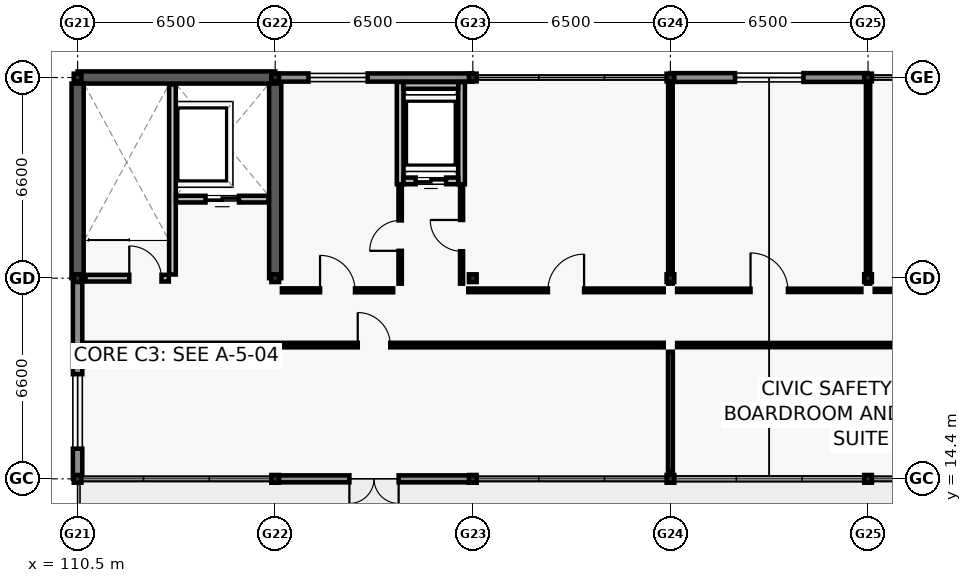
"""IFC4 building model, lengths in metres.
Left out: names, types, materials, properties, quantities, classifications, styles, units other than length and angle.
Written with IfcOpenShell. Run it as: python <this file> out.ifc"""

import sys

from ifc_helpers import new_model, si_unit, direction, frame, frame_2d, origin, origin_2d, place, context, subcontext, project, spatial, rectangle, i_section, extrude, element, fill, save


model = new_model("IFC4")
c1 = context("Model", 3, precision=1e-05, world=origin(), true_north=direction((0.0, 1.0)))
c2 = subcontext(c1, "Body", "Model", "MODEL_VIEW")
j1 = project(units=[si_unit("LENGTHUNIT", "METRE"), si_unit("PLANEANGLEUNIT", "RADIAN")], contexts=[c1])
p1 = place(None, origin())
s1 = spatial("IfcSite", under=j1, at=p1, CompositionType="ELEMENT")
p2 = place(p1, origin())
s2 = spatial("IfcBuilding", under=s1, at=p2, CompositionType="ELEMENT")
p3 = place(p2, frame((0.0, 0.0, 21.3)))
s3 = spatial("IfcBuildingStorey", under=s2, at=p3, CompositionType="ELEMENT", Elevation=21.3)
for number, where, z_axis, x_axis in (
    (1, (110.5, 14.4, 0.0), (0.0, 0.0, 1.0), (1.0, 0.0, 0.0)),
    (2, (110.5, 21.0, 0.0), (0.0, 0.0, 1.0), (1.0, 0.0, 0.0)),
    (3, (110.5, 27.6, 0.0), (0.0, 0.0, 1.0), (1.0, 0.0, 0.0)),
    (4, (117.0, 14.4, 0.0), (0.0, 0.0, 1.0), (1.0, 0.0, 0.0)),
    (5, (117.0, 21.0, 0.0), (0.0, 0.0, 1.0), (1.0, 0.0, 0.0)),
    (6, (117.0, 27.6, 0.0), (0.0, 0.0, 1.0), (1.0, 0.0, 0.0)),
    (7, (123.5, 14.4, 0.0), (0.0, 0.0, 1.0), (1.0, 0.0, 0.0)),
    (8, (123.5, 21.0, 0.0), (0.0, 0.0, 1.0), (1.0, 0.0, 0.0)),
    (9, (123.5, 27.6, 0.0), (0.0, 0.0, 1.0), (1.0, 0.0, 0.0)),
    (10, (130.0, 14.4, 0.0), (0.0, 0.0, 1.0), (1.0, 0.0, 0.0)),
    (11, (130.0, 21.0, 0.0), (0.0, 0.0, 1.0), (1.0, 0.0, 0.0)),
    (12, (130.0, 27.6, 0.0), (0.0, 0.0, 1.0), (1.0, 0.0, 0.0)),
    (13, (136.5, 14.4, 0.0), (0.0, 0.0, 1.0), (1.0, 0.0, 0.0)),
    (14, (136.5, 21.0, 0.0), (0.0, 0.0, 1.0), (1.0, 0.0, 0.0)),
    (15, (136.5, 27.6, 0.0), (0.0, 0.0, 1.0), (1.0, 0.0, 0.0)),
):
    element("IfcColumn", number, at=place(p3, frame(where, z_axis=z_axis, x_axis=x_axis)), inside=s3, PredefinedType="COLUMN", context=c2, shape_type="SweptSolid", body=[
        extrude(i_section(OverallWidth=0.254, OverallDepth=0.254, WebThickness=0.009, FlangeThickness=0.014, FilletRadius=0.013, at=origin_2d()), origin(), (0.0, 0.0, 1.0), 3.9),
    ])
p4 = place(p3, frame((110.5, 27.6, 0.0), z_axis=(0.0, 0.0, 1.0), x_axis=(1.0, 0.0, 0.0)))
e16 = element("IfcWall", 16, at=p4, inside=s3, PredefinedType="SHEAR", context=c2, shape_type="SweptSolid", body=[
    extrude(rectangle(XDim=6.5, YDim=0.4, at=frame_2d((3.25, 0.0))), origin(), (0.0, 0.0, 1.0), 3.66),
])
for number, where, z_axis, x_axis in (
    (17, (110.5, 21.0, 0.0), (0.0, 0.0, 1.0), (0.0, 1.0, 0.0)),
    (18, (117.0, 21.0, 0.0), (0.0, 0.0, 1.0), (0.0, 1.0, 0.0)),
):
    element("IfcWall", number, at=place(p3, frame(where, z_axis=z_axis, x_axis=x_axis)), inside=s3, PredefinedType="SHEAR", context=c2, shape_type="SweptSolid", body=[
        extrude(rectangle(XDim=6.4, YDim=0.4, at=frame_2d((3.2, 0.0))), origin(), (0.0, 0.0, 1.0), 3.66),
    ])
p5 = place(p3, frame((123.495, 14.4, 0.0), z_axis=(0.0, 0.0, 1.0), x_axis=(-1.0, 0.0, 0.0)))
e19 = element("IfcWall", 19, at=p5, inside=s3, PredefinedType="SOLIDWALL", context=c2, shape_type="SweptSolid", body=[
    extrude(rectangle(XDim=6.49, YDim=0.23, at=frame_2d((3.245, 0.0))), origin(), (0.0, 0.0, 1.0), 3.02),
])
p6 = place(p5, frame((2.435, 0.0, 0.0)))
e20 = element("IfcOpeningElement", 20, at=p6, cuts=e19, PredefinedType="OPENING", context=c2, shape_type="SweptSolid", body=[
    extrude(rectangle(XDim=1.62, YDim=2.18, at=frame_2d((0.81, 1.09))), frame((0.0, 0.125, 0.0), z_axis=(0.0, -1.0, 0.0), x_axis=(1.0, 0.0, 0.0)), (0.0, 0.0, 1.0), 0.25),
])
p7 = place(p3, frame((117.005, 27.6, 0.0), z_axis=(0.0, 0.0, 1.0), x_axis=(1.0, 0.0, 0.0)))
e21 = element("IfcWall", 21, at=p7, inside=s3, PredefinedType="SOLIDWALL", context=c2, shape_type="SweptSolid", body=[
    extrude(rectangle(XDim=6.49, YDim=0.27, at=frame_2d((3.245, 0.0))), origin(), (0.0, 0.0, 1.0), 3.02),
])
p8 = place(p7, frame((1.087, 0.0, 0.8)))
e22 = element("IfcOpeningElement", 22, at=p8, cuts=e21, PredefinedType="OPENING", context=c2, shape_type="SweptSolid", body=[
    extrude(rectangle(XDim=1.95, YDim=1.95, at=frame_2d((0.975, 0.975))), frame((0.0, 0.145, 0.0), z_axis=(0.0, -1.0, 0.0), x_axis=(1.0, 0.0, 0.0)), (0.0, 0.0, 1.0), 0.29),
])
p9 = place(p3, frame((130.005, 27.6, 0.0), z_axis=(0.0, 0.0, 1.0), x_axis=(1.0, 0.0, 0.0)))
e23 = element("IfcWall", 23, at=p9, inside=s3, PredefinedType="SOLIDWALL", context=c2, shape_type="SweptSolid", body=[
    extrude(rectangle(XDim=6.49, YDim=0.29, at=frame_2d((3.245, 0.0))), origin(), (0.0, 0.0, 1.0), 3.02),
])
p10 = place(p9, frame((2.12, 0.0, 0.8)))
e24 = element("IfcOpeningElement", 24, at=p10, cuts=e23, PredefinedType="OPENING", context=c2, shape_type="SweptSolid", body=[
    extrude(rectangle(XDim=2.25, YDim=1.95, at=frame_2d((1.125, 0.975))), frame((0.0, 0.155, 0.0), z_axis=(0.0, -1.0, 0.0), x_axis=(1.0, 0.0, 0.0)), (0.0, 0.0, 1.0), 0.31),
])
p11 = place(p3, frame((110.5, 14.405, 0.0), z_axis=(0.0, 0.0, 1.0), x_axis=(0.0, 1.0, 0.0)))
e25 = element("IfcWall", 25, at=p11, inside=s3, PredefinedType="SOLIDWALL", context=c2, shape_type="SweptSolid", body=[
    extrude(rectangle(XDim=6.59, YDim=0.31, at=frame_2d((3.295, 0.0))), origin(), (0.0, 0.0, 1.0), 3.02),
])
p12 = place(p11, frame((0.988, 0.0, 0.8)))
e26 = element("IfcOpeningElement", 26, at=p12, cuts=e25, PredefinedType="OPENING", context=c2, shape_type="SweptSolid", body=[
    extrude(rectangle(XDim=2.45, YDim=1.95, at=frame_2d((1.225, 0.975))), frame((0.0, 0.165, 0.0), z_axis=(0.0, -1.0, 0.0), x_axis=(1.0, 0.0, 0.0)), (0.0, 0.0, 1.0), 0.33),
])
p13 = place(p3, frame((113.62, 21.12, 0.0), z_axis=(0.0, 0.0, 1.0), x_axis=(0.0, 1.0, 0.0)))
e27 = element("IfcWall", 27, at=p13, inside=s3, PredefinedType="SOLIDWALL", context=c2, shape_type="SweptSolid", body=[
    extrude(rectangle(XDim=6.255, YDim=0.22, at=frame_2d((3.127, 0.0))), origin(), (0.0, 0.0, 1.0), 3.02),
])
p14 = place(p3, frame((110.76, 21.0, 0.0), z_axis=(0.0, 0.0, 1.0), x_axis=(1.0, 0.0, 0.0)))
e28 = element("IfcWall", 28, at=p14, inside=s3, PredefinedType="SOLIDWALL", context=c2, shape_type="SweptSolid", body=[
    extrude(rectangle(XDim=2.74, YDim=0.22, at=frame_2d((1.37, 0.0))), origin(), (0.0, 0.0, 1.0), 3.02),
])
p15 = place(p14, frame((1.44, 0.0, 0.0)))
e29 = element("IfcOpeningElement", 29, at=p15, cuts=e28, PredefinedType="OPENING", context=c2, shape_type="SweptSolid", body=[
    extrude(rectangle(XDim=1.06, YDim=2.1, at=frame_2d((0.53, 1.05))), frame((0.0, 0.12, 0.0), z_axis=(0.0, -1.0, 0.0), x_axis=(1.0, 0.0, 0.0)), (0.0, 0.0, 1.0), 0.24),
])
p16 = place(p3, frame((113.74, 23.6, 0.0), z_axis=(0.0, 0.0, 1.0), x_axis=(1.0, 0.0, 0.0)))
e30 = element("IfcWall", 30, at=p16, inside=s3, PredefinedType="SOLIDWALL", context=c2, shape_type="SweptSolid", body=[
    extrude(rectangle(XDim=3.035, YDim=0.22, at=frame_2d((1.518, 0.0))), origin(), (0.0, 0.0, 1.0), 3.02),
])
p17 = place(p16, frame((0.968, 0.0, 0.0)))
e31 = element("IfcOpeningElement", 31, at=p17, cuts=e30, PredefinedType="OPENING", context=c2, shape_type="SweptSolid", body=[
    extrude(rectangle(XDim=1.1, YDim=2.1, at=frame_2d((0.55, 1.05))), frame((0.0, 0.12, 0.0), z_axis=(0.0, -1.0, 0.0), x_axis=(1.0, 0.0, 0.0)), (0.0, 0.0, 1.0), 0.24),
])
for number, where, z_axis, x_axis in (
    (32, (121.11, 24.09, 0.0), (0.0, 0.0, 1.0), (0.0, 1.0, 0.0)),
    (33, (123.13, 24.09, 0.0), (0.0, 0.0, 1.0), (0.0, 1.0, 0.0)),
):
    element("IfcWall", number, at=place(p3, frame(where, z_axis=z_axis, x_axis=x_axis)), inside=s3, PredefinedType="SOLIDWALL", context=c2, shape_type="SweptSolid", body=[
        extrude(rectangle(XDim=3.36, YDim=0.22, at=frame_2d((1.68, 0.0))), origin(), (0.0, 0.0, 1.0), 3.02),
    ])
p18 = place(p3, frame((121.22, 27.34, 0.0), z_axis=(0.0, 0.0, 1.0), x_axis=(1.0, 0.0, 0.0)))
e34 = element("IfcWall", 34, at=p18, inside=s3, PredefinedType="SOLIDWALL", context=c2, shape_type="SweptSolid", body=[
    extrude(rectangle(XDim=1.8, YDim=0.22, at=frame_2d((0.9, 0.0))), origin(), (0.0, 0.0, 1.0), 3.02),
])
p19 = place(p3, frame((121.22, 24.2, 0.0), z_axis=(0.0, 0.0, 1.0), x_axis=(1.0, 0.0, 0.0)))
e35 = element("IfcWall", 35, at=p19, inside=s3, PredefinedType="SOLIDWALL", context=c2, shape_type="SweptSolid", body=[
    extrude(rectangle(XDim=1.8, YDim=0.22, at=frame_2d((0.9, 0.0))), origin(), (0.0, 0.0, 1.0), 3.02),
])
p20 = place(p19, frame((0.4, 0.0, 0.0)))
e36 = element("IfcOpeningElement", 36, at=p20, cuts=e35, PredefinedType="OPENING", context=c2, shape_type="SweptSolid", body=[
    extrude(rectangle(XDim=1.0, YDim=2.1, at=frame_2d((0.5, 1.05))), frame((0.0, 0.12, 0.0), z_axis=(0.0, -1.0, 0.0), x_axis=(1.0, 0.0, 0.0)), (0.0, 0.0, 1.0), 0.24),
])
p21 = place(p3, frame((121.11, 20.82, 0.0), z_axis=(0.0, 0.0, 1.0), x_axis=(0.0, 1.0, 0.0)))
e37 = element("IfcWall", 37, at=p21, inside=s3, PredefinedType="PARTITIONING", context=c2, shape_type="SweptSolid", body=[
    extrude(rectangle(XDim=3.16, YDim=0.11, at=frame_2d((1.58, 0.0))), origin(), (0.0, 0.0, 1.0), 3.0),
])
p22 = place(p21, frame((1.08, 0.0, 0.0)))
e38 = element("IfcOpeningElement", 38, at=p22, cuts=e37, PredefinedType="OPENING", context=c2, shape_type="SweptSolid", body=[
    extrude(rectangle(XDim=1.0, YDim=2.12, at=frame_2d((0.5, 1.06))), frame((0.0, 0.065, 0.0), z_axis=(0.0, -1.0, 0.0), x_axis=(1.0, 0.0, 0.0)), (0.0, 0.0, 1.0), 0.13),
])
p23 = place(p3, frame((123.13, 20.82, 0.0), z_axis=(0.0, 0.0, 1.0), x_axis=(0.0, 1.0, 0.0)))
e39 = element("IfcWall", 39, at=p23, inside=s3, PredefinedType="PARTITIONING", context=c2, shape_type="SweptSolid", body=[
    extrude(rectangle(XDim=3.16, YDim=0.1, at=frame_2d((1.58, 0.0))), origin(), (0.0, 0.0, 1.0), 3.0),
])
p24 = place(p23, frame((1.065, 0.0, 0.0)))
e40 = element("IfcOpeningElement", 40, at=p24, cuts=e39, PredefinedType="OPENING", context=c2, shape_type="SweptSolid", body=[
    extrude(rectangle(XDim=1.03, YDim=2.06, at=frame_2d((0.515, 1.03))), frame((0.0, 0.06, 0.0), z_axis=(0.0, -1.0, 0.0), x_axis=(1.0, 0.0, 0.0)), (0.0, 0.0, 1.0), 0.12),
])
p25 = place(p3, frame((130.0, 14.62, 0.0), z_axis=(0.0, 0.0, 1.0), x_axis=(0.0, 1.0, 0.0)))
e41 = element("IfcWall", 41, at=p25, inside=s3, PredefinedType="PARTITIONING", context=c2, shape_type="SweptSolid", body=[
    extrude(rectangle(XDim=3.96, YDim=0.16, at=frame_2d((1.98, 0.0))), origin(), (0.0, 0.0, 1.0), 3.0),
])
p26 = place(p3, frame((110.72, 18.8, 0.0), z_axis=(0.0, 0.0, 1.0), x_axis=(1.0, 0.0, 0.0)))
e42 = element("IfcWall", 42, at=p26, inside=s3, PredefinedType="PARTITIONING", context=c2, shape_type="SweptSolid", body=[
    extrude(rectangle(XDim=19.06, YDim=0.15, at=frame_2d((9.53, 0.0))), origin(), (0.0, 0.0, 1.0), 3.0),
])
p27 = place(p26, frame((8.995, 0.0, 0.0)))
e43 = element("IfcOpeningElement", 43, at=p27, cuts=e42, PredefinedType="OPENING", context=c2, shape_type="SweptSolid", body=[
    extrude(rectangle(XDim=1.07, YDim=2.08, at=frame_2d((0.535, 1.04))), frame((0.0, 0.085, 0.0), z_axis=(0.0, -1.0, 0.0), x_axis=(1.0, 0.0, 0.0)), (0.0, 0.0, 1.0), 0.17),
])
p28 = place(p3, frame((130.22, 18.8, 0.0), z_axis=(0.0, 0.0, 1.0), x_axis=(1.0, 0.0, 0.0)))
e44 = element("IfcWall", 44, at=p28, inside=s3, PredefinedType="PARTITIONING", context=c2, shape_type="SweptSolid", body=[
    extrude(rectangle(XDim=25.56, YDim=0.14, at=frame_2d((12.78, 0.0))), origin(), (0.0, 0.0, 1.0), 3.0),
])
p29 = place(p28, frame((12.225, 0.0, 0.0)))
e45 = element("IfcOpeningElement", 45, at=p29, cuts=e44, PredefinedType="OPENING", context=c2, shape_type="SweptSolid", body=[
    extrude(rectangle(XDim=1.11, YDim=2.1, at=frame_2d((0.555, 1.05))), frame((0.0, 0.08, 0.0), z_axis=(0.0, -1.0, 0.0), x_axis=(1.0, 0.0, 0.0)), (0.0, 0.0, 1.0), 0.16),
])
p30 = place(p3, frame((117.22, 20.6, 0.0), z_axis=(0.0, 0.0, 1.0), x_axis=(1.0, 0.0, 0.0)))
e46 = element("IfcWall", 46, at=p30, inside=s3, PredefinedType="PARTITIONING", context=c2, shape_type="SweptSolid", body=[
    extrude(rectangle(XDim=3.66, YDim=0.13, at=frame_2d((1.83, 0.0))), origin(), (0.0, 0.0, 1.0), 3.0),
])
p31 = place(p30, frame((1.255, 0.0, 0.0)))
e47 = element("IfcOpeningElement", 47, at=p31, cuts=e46, PredefinedType="OPENING", context=c2, shape_type="SweptSolid", body=[
    extrude(rectangle(XDim=1.15, YDim=2.12, at=frame_2d((0.575, 1.06))), frame((0.0, 0.075, 0.0), z_axis=(0.0, -1.0, 0.0), x_axis=(1.0, 0.0, 0.0)), (0.0, 0.0, 1.0), 0.15),
])
p32 = place(p3, frame((123.35, 20.6, 0.0), z_axis=(0.0, 0.0, 1.0), x_axis=(1.0, 0.0, 0.0)))
e48 = element("IfcWall", 48, at=p32, inside=s3, PredefinedType="PARTITIONING", context=c2, shape_type="SweptSolid", body=[
    extrude(rectangle(XDim=6.43, YDim=0.12, at=frame_2d((3.215, 0.0))), origin(), (0.0, 0.0, 1.0), 3.0),
])
p33 = place(p32, frame((2.62, 0.0, 0.0)))
e49 = element("IfcOpeningElement", 49, at=p33, cuts=e48, PredefinedType="OPENING", context=c2, shape_type="SweptSolid", body=[
    extrude(rectangle(XDim=1.19, YDim=2.14, at=frame_2d((0.595, 1.07))), frame((0.0, 0.07, 0.0), z_axis=(0.0, -1.0, 0.0), x_axis=(1.0, 0.0, 0.0)), (0.0, 0.0, 1.0), 0.14),
])
p34 = place(p3, frame((130.22, 20.6, 0.0), z_axis=(0.0, 0.0, 1.0), x_axis=(1.0, 0.0, 0.0)))
e50 = element("IfcWall", 50, at=p34, inside=s3, PredefinedType="PARTITIONING", context=c2, shape_type="SweptSolid", body=[
    extrude(rectangle(XDim=6.06, YDim=0.11, at=frame_2d((3.03, 0.0))), origin(), (0.0, 0.0, 1.0), 3.0),
])
p35 = place(p34, frame((2.415, 0.0, 0.0)))
e51 = element("IfcOpeningElement", 51, at=p35, cuts=e50, PredefinedType="OPENING", context=c2, shape_type="SweptSolid", body=[
    extrude(rectangle(XDim=1.23, YDim=2.08, at=frame_2d((0.615, 1.04))), frame((0.0, 0.065, 0.0), z_axis=(0.0, -1.0, 0.0), x_axis=(1.0, 0.0, 0.0)), (0.0, 0.0, 1.0), 0.13),
])
p36 = place(p3, frame((136.72, 20.6, 0.0), z_axis=(0.0, 0.0, 1.0), x_axis=(1.0, 0.0, 0.0)))
e52 = element("IfcWall", 52, at=p36, inside=s3, PredefinedType="PARTITIONING", context=c2, shape_type="SweptSolid", body=[
    extrude(rectangle(XDim=6.06, YDim=0.1, at=frame_2d((3.03, 0.0))), origin(), (0.0, 0.0, 1.0), 3.0),
])
p37 = place(p36, frame((2.395, 0.0, 0.0)))
e53 = element("IfcOpeningElement", 53, at=p37, cuts=e52, PredefinedType="OPENING", context=c2, shape_type="SweptSolid", body=[
    extrude(rectangle(XDim=1.27, YDim=2.1, at=frame_2d((0.635, 1.05))), frame((0.0, 0.06, 0.0), z_axis=(0.0, -1.0, 0.0), x_axis=(1.0, 0.0, 0.0)), (0.0, 0.0, 1.0), 0.12),
])
p38 = place(p3, frame((130.0, 20.82, 0.0), z_axis=(0.0, 0.0, 1.0), x_axis=(0.0, 1.0, 0.0)))
e54 = element("IfcWall", 54, at=p38, inside=s3, PredefinedType="PARTITIONING", context=c2, shape_type="SweptSolid", body=[
    extrude(rectangle(XDim=6.56, YDim=0.15, at=frame_2d((3.28, 0.0))), origin(), (0.0, 0.0, 1.0), 3.0),
])
p39 = place(p3, frame((136.5, 20.82, 0.0), z_axis=(0.0, 0.0, 1.0), x_axis=(0.0, 1.0, 0.0)))
e55 = element("IfcWall", 55, at=p39, inside=s3, PredefinedType="PARTITIONING", context=c2, shape_type="SweptSolid", body=[
    extrude(rectangle(XDim=6.56, YDim=0.14, at=frame_2d((3.28, 0.0))), origin(), (0.0, 0.0, 1.0), 3.0),
])
p40 = place(p6, origin())
e56 = element("IfcDoor", 56, at=p40, inside=s3, OperationType="DOUBLE_DOOR_SINGLE_SWING", PredefinedType="DOOR", context=c2, shape_type="SweptSolid", body=[
    extrude(rectangle(XDim=1.62, YDim=2.18, at=frame_2d((0.81, 1.09))), frame((0.0, 0.025, 0.0), z_axis=(0.0, -1.0, 0.0), x_axis=(1.0, 0.0, 0.0)), (0.0, 0.0, 1.0), 0.05),
])
fill(e20, e56)
p41 = place(p8, origin())
e57 = element("IfcWindow", 57, at=p41, inside=s3, PartitioningType="DOUBLE_PANEL_VERTICAL", PredefinedType="WINDOW", context=c2, shape_type="SweptSolid", body=[
    extrude(rectangle(XDim=1.95, YDim=1.95, at=frame_2d((0.975, 0.975))), frame((0.0, 0.03, 0.0), z_axis=(0.0, -1.0, 0.0), x_axis=(1.0, 0.0, 0.0)), (0.0, 0.0, 1.0), 0.06),
])
fill(e22, e57)
p42 = place(p10, origin())
e58 = element("IfcWindow", 58, at=p42, inside=s3, PartitioningType="DOUBLE_PANEL_VERTICAL", PredefinedType="WINDOW", context=c2, shape_type="SweptSolid", body=[
    extrude(rectangle(XDim=2.25, YDim=1.95, at=frame_2d((1.125, 0.975))), frame((0.0, 0.03, 0.0), z_axis=(0.0, -1.0, 0.0), x_axis=(1.0, 0.0, 0.0)), (0.0, 0.0, 1.0), 0.06),
])
fill(e24, e58)
p43 = place(p12, origin())
e59 = element("IfcWindow", 59, at=p43, inside=s3, PartitioningType="TRIPLE_PANEL_VERTICAL", PredefinedType="WINDOW", context=c2, shape_type="SweptSolid", body=[
    extrude(rectangle(XDim=2.45, YDim=1.95, at=frame_2d((1.225, 0.975))), frame((0.0, 0.03, 0.0), z_axis=(0.0, -1.0, 0.0), x_axis=(1.0, 0.0, 0.0)), (0.0, 0.0, 1.0), 0.06),
])
fill(e26, e59)
p44 = place(p15, origin())
e60 = element("IfcDoor", 60, at=p44, inside=s3, OperationType="SINGLE_SWING_LEFT", PredefinedType="DOOR", context=c2, shape_type="SweptSolid", body=[
    extrude(rectangle(XDim=1.06, YDim=2.1, at=frame_2d((0.53, 1.05))), frame((0.0, 0.025, 0.0), z_axis=(0.0, -1.0, 0.0), x_axis=(1.0, 0.0, 0.0)), (0.0, 0.0, 1.0), 0.05),
])
fill(e29, e60)
p45 = place(p17, origin())
e61 = element("IfcDoor", 61, at=p45, inside=s3, OperationType="DOUBLE_DOOR_SLIDING", PredefinedType="DOOR", context=c2, shape_type="SweptSolid", body=[
    extrude(rectangle(XDim=1.1, YDim=2.1, at=frame_2d((0.55, 1.05))), frame((0.0, 0.025, 0.0), z_axis=(0.0, -1.0, 0.0), x_axis=(1.0, 0.0, 0.0)), (0.0, 0.0, 1.0), 0.05),
])
fill(e31, e61)
p46 = place(p20, origin())
e62 = element("IfcDoor", 62, at=p46, inside=s3, OperationType="DOUBLE_DOOR_SLIDING", PredefinedType="DOOR", context=c2, shape_type="SweptSolid", body=[
    extrude(rectangle(XDim=1.0, YDim=2.1, at=frame_2d((0.5, 1.05))), frame((0.0, 0.025, 0.0), z_axis=(0.0, -1.0, 0.0), x_axis=(1.0, 0.0, 0.0)), (0.0, 0.0, 1.0), 0.05),
])
fill(e36, e62)
p47 = place(p22, origin())
e63 = element("IfcDoor", 63, at=p47, inside=s3, OperationType="SINGLE_SWING_LEFT", PredefinedType="DOOR", context=c2, shape_type="SweptSolid", body=[
    extrude(rectangle(XDim=1.0, YDim=2.12, at=frame_2d((0.5, 1.06))), frame((0.0, 0.025, 0.0), z_axis=(0.0, -1.0, 0.0), x_axis=(1.0, 0.0, 0.0)), (0.0, 0.0, 1.0), 0.05),
])
fill(e38, e63)
p48 = place(p24, origin())
e64 = element("IfcDoor", 64, at=p48, inside=s3, OperationType="SINGLE_SWING_RIGHT", PredefinedType="DOOR", context=c2, shape_type="SweptSolid", body=[
    extrude(rectangle(XDim=1.03, YDim=2.06, at=frame_2d((0.515, 1.03))), frame((0.0, 0.025, 0.0), z_axis=(0.0, -1.0, 0.0), x_axis=(1.0, 0.0, 0.0)), (0.0, 0.0, 1.0), 0.05),
])
fill(e40, e64)
p49 = place(p27, origin())
e65 = element("IfcDoor", 65, at=p49, inside=s3, OperationType="SINGLE_SWING_LEFT", PredefinedType="DOOR", context=c2, shape_type="SweptSolid", body=[
    extrude(rectangle(XDim=1.07, YDim=2.08, at=frame_2d((0.535, 1.04))), frame((0.0, 0.025, 0.0), z_axis=(0.0, -1.0, 0.0), x_axis=(1.0, 0.0, 0.0)), (0.0, 0.0, 1.0), 0.05),
])
fill(e43, e65)
p50 = place(p31, origin())
e66 = element("IfcDoor", 66, at=p50, inside=s3, OperationType="SINGLE_SWING_LEFT", PredefinedType="DOOR", context=c2, shape_type="SweptSolid", body=[
    extrude(rectangle(XDim=1.15, YDim=2.12, at=frame_2d((0.575, 1.06))), frame((0.0, 0.025, 0.0), z_axis=(0.0, -1.0, 0.0), x_axis=(1.0, 0.0, 0.0)), (0.0, 0.0, 1.0), 0.05),
])
fill(e47, e66)
p51 = place(p33, origin())
e67 = element("IfcDoor", 67, at=p51, inside=s3, OperationType="SINGLE_SWING_RIGHT", PredefinedType="DOOR", context=c2, shape_type="SweptSolid", body=[
    extrude(rectangle(XDim=1.19, YDim=2.14, at=frame_2d((0.595, 1.07))), frame((0.0, 0.025, 0.0), z_axis=(0.0, -1.0, 0.0), x_axis=(1.0, 0.0, 0.0)), (0.0, 0.0, 1.0), 0.05),
])
fill(e49, e67)
p52 = place(p35, origin())
e68 = element("IfcDoor", 68, at=p52, inside=s3, OperationType="SINGLE_SWING_LEFT", PredefinedType="DOOR", context=c2, shape_type="SweptSolid", body=[
    extrude(rectangle(XDim=1.23, YDim=2.08, at=frame_2d((0.615, 1.04))), frame((0.0, 0.025, 0.0), z_axis=(0.0, -1.0, 0.0), x_axis=(1.0, 0.0, 0.0)), (0.0, 0.0, 1.0), 0.05),
])
fill(e51, e68)
save(model, sys.argv[1])
